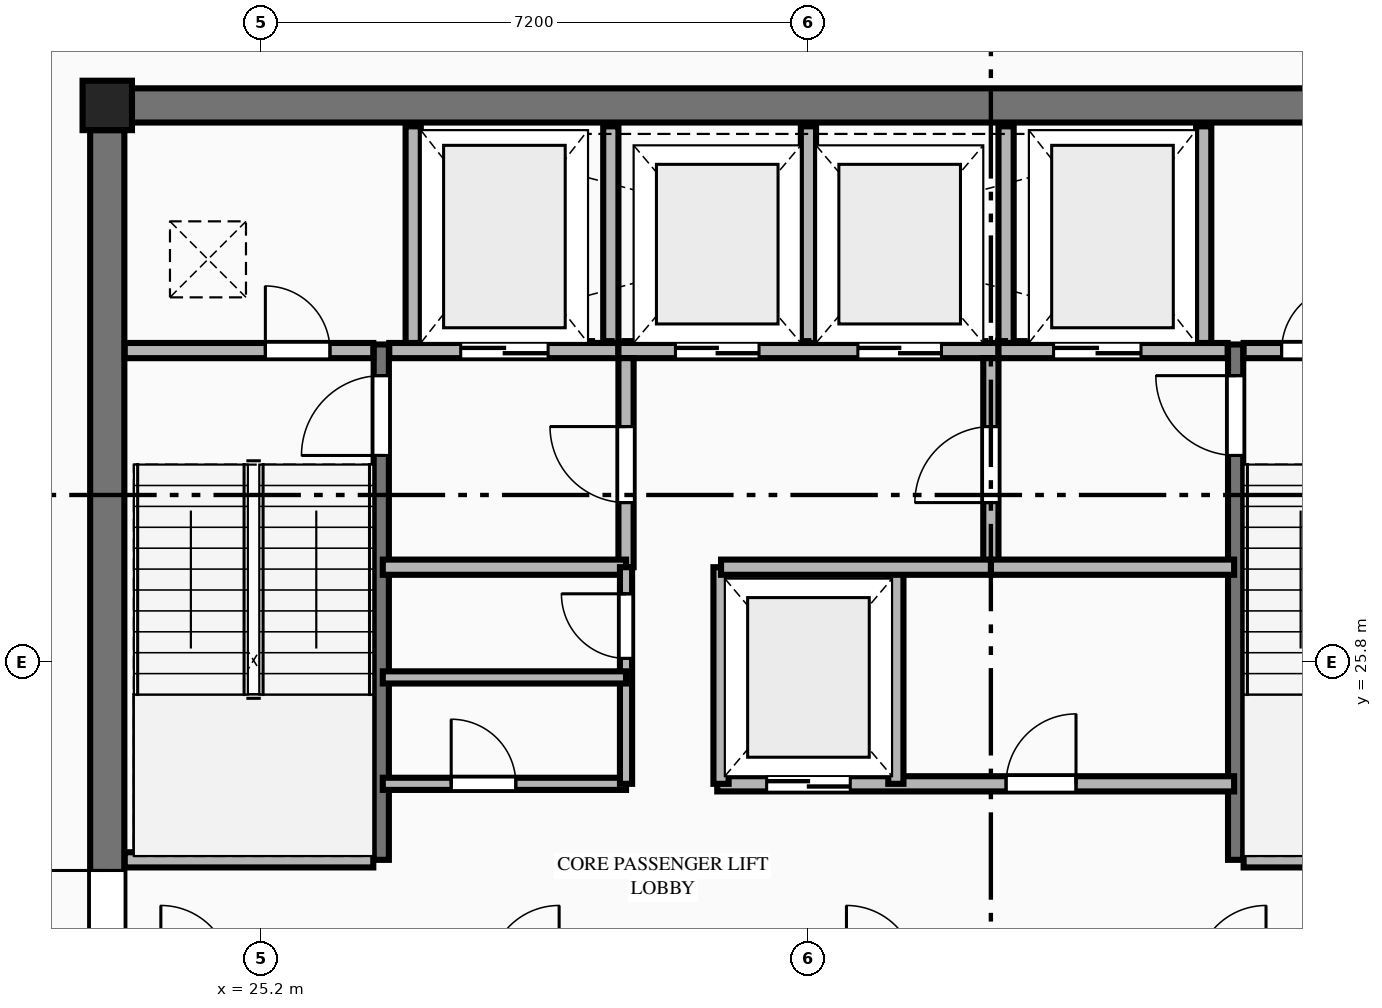
"""IFC4 building model, lengths in metres.
Left out: names, types, materials, properties, quantities, classifications, styles, units other than length and angle.
Written with IfcOpenShell. Run it as: python <this file> out.ifc"""

import sys

from ifc_helpers import new_model, si_unit, direction, frame, frame_2d, origin, origin_2d, place, context, subcontext, project, spatial, rectangle, extrude, element, fill, save


model = new_model("IFC4")
c1 = context("Model", 3, precision=1e-05, world=origin(), true_north=direction((0.0, 1.0)))
c2 = subcontext(c1, "Body", "Model", "MODEL_VIEW")
j1 = project(units=[si_unit("LENGTHUNIT", "METRE"), si_unit("PLANEANGLEUNIT", "RADIAN")], contexts=[c1])
p1 = place(None, origin())
s1 = spatial("IfcSite", under=j1, at=p1, CompositionType="ELEMENT")
p2 = place(p1, origin())
s2 = spatial("IfcBuilding", under=s1, at=p2, CompositionType="ELEMENT")
p3 = place(p2, frame((0.0, 0.0, 291.5)))
s3 = spatial("IfcBuildingStorey", under=s2, at=p3, CompositionType="ELEMENT", Elevation=291.5)
p4 = place(p3, frame((23.175, 33.125, 0.0), z_axis=(0.0, 0.0, 1.0), x_axis=(1.0, 0.0, 0.0)))
e1 = element("IfcColumn", 1, at=p4, inside=s3, PredefinedType="COLUMN", context=c2, shape_type="SweptSolid", body=[
    extrude(rectangle(XDim=0.65, YDim=0.65, at=origin_2d()), origin(), (0.0, 0.0, 1.0), 4.0),
])
p5 = place(p3, frame((23.5, 33.125, 0.0), z_axis=(0.0, 0.0, 1.0), x_axis=(1.0, 0.0, 0.0)))
e2 = element("IfcWall", 2, at=p5, inside=s3, PredefinedType="SHEAR", context=c2, shape_type="SweptSolid", body=[
    extrude(rectangle(XDim=17.8, YDim=0.45, at=frame_2d((8.9, 0.0))), origin(), (0.0, 0.0, 1.0), 3.8),
])
p6 = place(p3, frame((23.175, 19.0, 0.0), z_axis=(0.0, 0.0, 1.0), x_axis=(0.0, 1.0, 0.0)))
e3 = element("IfcWall", 3, at=p6, inside=s3, PredefinedType="SHEAR", context=c2, shape_type="SweptSolid", body=[
    extrude(rectangle(XDim=13.8, YDim=0.45, at=frame_2d((6.9, 0.0))), origin(), (0.0, 0.0, 1.0), 3.8),
])
p7 = place(p6, frame((2.84, 0.0, 0.0)))
e4 = element("IfcOpeningElement", 4, at=p7, cuts=e3, PredefinedType="OPENING", context=c2, shape_type="SweptSolid", body=[
    extrude(rectangle(XDim=1.22, YDim=2.25, at=frame_2d((0.61, 1.125))), frame((0.0, 0.235, 0.0), z_axis=(0.0, -1.0, 0.0), x_axis=(1.0, 0.0, 0.0)), (0.0, 0.0, 1.0), 0.47),
])
p8 = place(p3, frame((26.78, 23.2, 0.0), z_axis=(0.0, 0.0, 1.0), x_axis=(0.0, 1.0, 0.0)))
e5 = element("IfcWall", 5, at=p8, inside=s3, PredefinedType="SHEAR", context=c2, shape_type="SweptSolid", body=[
    extrude(rectangle(XDim=6.78, YDim=0.2, at=frame_2d((3.39, 0.0))), origin(), (0.0, 0.0, 1.0), 4.0),
])
p9 = place(p8, frame((5.32, 0.0, 0.0)))
e6 = element("IfcOpeningElement", 6, at=p9, cuts=e5, PredefinedType="OPENING", context=c2, shape_type="SweptSolid", body=[
    extrude(rectangle(XDim=1.05, YDim=2.15, at=frame_2d((0.525, 1.075))), frame((0.0, 0.11, 0.0), z_axis=(0.0, -1.0, 0.0), x_axis=(1.0, 0.0, 0.0)), (0.0, 0.0, 1.0), 0.22),
])
p10 = place(p3, frame((23.405, 23.2, 0.0), z_axis=(0.0, 0.0, 1.0), x_axis=(1.0, 0.0, 0.0)))
e7 = element("IfcWall", 7, at=p10, inside=s3, PredefinedType="PLUMBINGWALL", context=c2, shape_type="SweptSolid", body=[
    extrude(rectangle(XDim=3.27, YDim=0.2, at=frame_2d((1.635, 0.0))), origin(), (0.0, 0.0, 1.0), 3.8),
])
p11 = place(p3, frame((38.02, 23.2, 0.0), z_axis=(0.0, 0.0, 1.0), x_axis=(0.0, 1.0, 0.0)))
e8 = element("IfcWall", 8, at=p11, inside=s3, PredefinedType="SHEAR", context=c2, shape_type="SweptSolid", body=[
    extrude(rectangle(XDim=6.78, YDim=0.2, at=frame_2d((3.39, 0.0))), origin(), (0.0, 0.0, 1.0), 4.0),
])
p12 = place(p11, frame((5.32, 0.0, 0.0)))
e9 = element("IfcOpeningElement", 9, at=p12, cuts=e8, PredefinedType="OPENING", context=c2, shape_type="SweptSolid", body=[
    extrude(rectangle(XDim=1.05, YDim=2.15, at=frame_2d((0.525, 1.075))), frame((0.0, 0.11, 0.0), z_axis=(0.0, -1.0, 0.0), x_axis=(1.0, 0.0, 0.0)), (0.0, 0.0, 1.0), 0.22),
])
p13 = place(p3, frame((38.125, 23.2, 0.0), z_axis=(0.0, 0.0, 1.0), x_axis=(1.0, 0.0, 0.0)))
e10 = element("IfcWall", 10, at=p13, inside=s3, PredefinedType="PLUMBINGWALL", context=c2, shape_type="SweptSolid", body=[
    extrude(rectangle(XDim=3.27, YDim=0.2, at=frame_2d((1.635, 0.0))), origin(), (0.0, 0.0, 1.0), 3.8),
])
p14 = place(p3, frame((23.405, 29.9, 0.0), z_axis=(0.0, 0.0, 1.0), x_axis=(1.0, 0.0, 0.0)))
e11 = element("IfcWall", 11, at=p14, inside=s3, PredefinedType="PLUMBINGWALL", context=c2, shape_type="SweptSolid", body=[
    extrude(rectangle(XDim=3.27, YDim=0.2, at=frame_2d((1.635, 0.0))), origin(), (0.0, 0.0, 1.0), 3.8),
])
p15 = place(p14, frame((1.85, 0.0, 0.0)))
e12 = element("IfcOpeningElement", 12, at=p15, cuts=e11, PredefinedType="OPENING", context=c2, shape_type="SweptSolid", body=[
    extrude(rectangle(XDim=0.85, YDim=2.05, at=frame_2d((0.425, 1.025))), frame((0.0, 0.11, 0.0), z_axis=(0.0, -1.0, 0.0), x_axis=(1.0, 0.0, 0.0)), (0.0, 0.0, 1.0), 0.22),
])
p16 = place(p3, frame((26.885, 29.9, 0.0), z_axis=(0.0, 0.0, 1.0), x_axis=(1.0, 0.0, 0.0)))
e13 = element("IfcWall", 13, at=p16, inside=s3, PredefinedType="PLUMBINGWALL", context=c2, shape_type="SweptSolid", body=[
    extrude(rectangle(XDim=3.015, YDim=0.2, at=frame_2d((1.507, 0.0))), origin(), (0.0, 0.0, 1.0), 3.8),
])
p17 = place(p16, frame((0.94, 0.0, 0.0)))
e14 = element("IfcOpeningElement", 14, at=p17, cuts=e13, PredefinedType="OPENING", context=c2, shape_type="SweptSolid", body=[
    extrude(rectangle(XDim=1.15, YDim=2.2, at=frame_2d((0.575, 1.1))), frame((0.0, 0.11, 0.0), z_axis=(0.0, -1.0, 0.0), x_axis=(1.0, 0.0, 0.0)), (0.0, 0.0, 1.0), 0.22),
])
p18 = place(p3, frame((29.9, 29.9, 0.0), z_axis=(0.0, 0.0, 1.0), x_axis=(1.0, 0.0, 0.0)))
e15 = element("IfcWall", 15, at=p18, inside=s3, PredefinedType="PLUMBINGWALL", context=c2, shape_type="SweptSolid", body=[
    extrude(rectangle(XDim=5.0, YDim=0.2, at=frame_2d((2.5, 0.0))), origin(), (0.0, 0.0, 1.0), 3.8),
])
p19 = place(p18, frame((0.75, 0.0, 0.0)))
e16 = element("IfcOpeningElement", 16, at=p19, cuts=e15, PredefinedType="OPENING", context=c2, shape_type="SweptSolid", body=[
    extrude(rectangle(XDim=1.1, YDim=2.2, at=frame_2d((0.55, 1.1))), frame((0.0, 0.11, 0.0), z_axis=(0.0, -1.0, 0.0), x_axis=(1.0, 0.0, 0.0)), (0.0, 0.0, 1.0), 0.22),
])
p20 = place(p18, frame((3.15, 0.0, 0.0)))
e17 = element("IfcOpeningElement", 17, at=p20, cuts=e15, PredefinedType="OPENING", context=c2, shape_type="SweptSolid", body=[
    extrude(rectangle(XDim=1.1, YDim=2.2, at=frame_2d((0.55, 1.1))), frame((0.0, 0.11, 0.0), z_axis=(0.0, -1.0, 0.0), x_axis=(1.0, 0.0, 0.0)), (0.0, 0.0, 1.0), 0.22),
])
p21 = place(p3, frame((34.9, 29.9, 0.0), z_axis=(0.0, 0.0, 1.0), x_axis=(1.0, 0.0, 0.0)))
e18 = element("IfcWall", 18, at=p21, inside=s3, PredefinedType="PLUMBINGWALL", context=c2, shape_type="SweptSolid", body=[
    extrude(rectangle(XDim=3.015, YDim=0.2, at=frame_2d((1.508, 0.0))), origin(), (0.0, 0.0, 1.0), 3.8),
])
p22 = place(p21, frame((0.725, 0.0, 0.0)))
e19 = element("IfcOpeningElement", 19, at=p22, cuts=e18, PredefinedType="OPENING", context=c2, shape_type="SweptSolid", body=[
    extrude(rectangle(XDim=1.15, YDim=2.2, at=frame_2d((0.575, 1.1))), frame((0.0, 0.11, 0.0), z_axis=(0.0, -1.0, 0.0), x_axis=(1.0, 0.0, 0.0)), (0.0, 0.0, 1.0), 0.22),
])
p23 = place(p3, frame((38.125, 29.9, 0.0), z_axis=(0.0, 0.0, 1.0), x_axis=(1.0, 0.0, 0.0)))
e20 = element("IfcWall", 20, at=p23, inside=s3, PredefinedType="PLUMBINGWALL", context=c2, shape_type="SweptSolid", body=[
    extrude(rectangle(XDim=3.27, YDim=0.2, at=frame_2d((1.635, 0.0))), origin(), (0.0, 0.0, 1.0), 3.8),
])
p24 = place(p23, frame((0.5, 0.0, 0.0)))
e21 = element("IfcOpeningElement", 21, at=p24, cuts=e20, PredefinedType="OPENING", context=c2, shape_type="SweptSolid", body=[
    extrude(rectangle(XDim=0.85, YDim=2.05, at=frame_2d((0.425, 1.025))), frame((0.0, 0.11, 0.0), z_axis=(0.0, -1.0, 0.0), x_axis=(1.0, 0.0, 0.0)), (0.0, 0.0, 1.0), 0.22),
])
for number, where, z_axis, x_axis in (
    (22, (27.2, 30.0, 0.0), (0.0, 0.0, 1.0), (0.0, 1.0, 0.0)),
    (23, (29.8, 30.0, 0.0), (0.0, 0.0, 1.0), (0.0, 1.0, 0.0)),
    (24, (32.4, 30.0, 0.0), (0.0, 0.0, 1.0), (0.0, 1.0, 0.0)),
    (25, (35.0, 30.0, 0.0), (0.0, 0.0, 1.0), (0.0, 1.0, 0.0)),
    (26, (37.6, 30.0, 0.0), (0.0, 0.0, 1.0), (0.0, 1.0, 0.0)),
):
    element("IfcWall", number, at=place(p3, frame(where, z_axis=z_axis, x_axis=x_axis)), inside=s3, PredefinedType="PLUMBINGWALL", context=c2, shape_type="SweptSolid", body=[
        extrude(rectangle(XDim=2.85, YDim=0.2, at=frame_2d((1.425, 0.0))), origin(), (0.0, 0.0, 1.0), 3.8),
    ])
p25 = place(p3, frame((30.0, 27.05, 0.0), z_axis=(0.0, 0.0, 1.0), x_axis=(0.0, 1.0, 0.0)))
e27 = element("IfcWall", 27, at=p25, inside=s3, PredefinedType="PLUMBINGWALL", context=c2, shape_type="SweptSolid", body=[
    extrude(rectangle(XDim=2.75, YDim=0.2, at=frame_2d((1.375, 0.0))), origin(), (0.0, 0.0, 1.0), 3.8),
])
p26 = place(p25, frame((0.85, 0.0, 0.0)))
e28 = element("IfcOpeningElement", 28, at=p26, cuts=e27, PredefinedType="OPENING", context=c2, shape_type="SweptSolid", body=[
    extrude(rectangle(XDim=1.0, YDim=2.15, at=frame_2d((0.5, 1.075))), frame((0.0, 0.11, 0.0), z_axis=(0.0, -1.0, 0.0), x_axis=(1.0, 0.0, 0.0)), (0.0, 0.0, 1.0), 0.22),
])
p27 = place(p3, frame((26.8, 27.05, 0.0), z_axis=(0.0, 0.0, 1.0), x_axis=(1.0, 0.0, 0.0)))
e29 = element("IfcWall", 29, at=p27, inside=s3, PredefinedType="PLUMBINGWALL", context=c2, shape_type="SweptSolid", body=[
    extrude(rectangle(XDim=3.2, YDim=0.2, at=frame_2d((1.6, 0.0))), origin(), (0.0, 0.0, 1.0), 3.8),
])
p28 = place(p3, frame((34.8, 27.05, 0.0), z_axis=(0.0, 0.0, 1.0), x_axis=(0.0, 1.0, 0.0)))
e30 = element("IfcWall", 30, at=p28, inside=s3, PredefinedType="PLUMBINGWALL", context=c2, shape_type="SweptSolid", body=[
    extrude(rectangle(XDim=2.75, YDim=0.2, at=frame_2d((1.375, 0.0))), origin(), (0.0, 0.0, 1.0), 3.8),
])
p29 = place(p28, frame((0.85, 0.0, 0.0)))
e31 = element("IfcOpeningElement", 31, at=p29, cuts=e30, PredefinedType="OPENING", context=c2, shape_type="SweptSolid", body=[
    extrude(rectangle(XDim=1.0, YDim=2.15, at=frame_2d((0.5, 1.075))), frame((0.0, 0.11, 0.0), z_axis=(0.0, -1.0, 0.0), x_axis=(1.0, 0.0, 0.0)), (0.0, 0.0, 1.0), 0.22),
])
p30 = place(p3, frame((34.8, 27.05, 0.0), z_axis=(0.0, 0.0, 1.0), x_axis=(1.0, 0.0, 0.0)))
e32 = element("IfcWall", 32, at=p30, inside=s3, PredefinedType="PLUMBINGWALL", context=c2, shape_type="SweptSolid", body=[
    extrude(rectangle(XDim=3.2, YDim=0.2, at=frame_2d((1.6, 0.0))), origin(), (0.0, 0.0, 1.0), 3.8),
])
p31 = place(p3, frame((26.8, 24.2, 0.0), z_axis=(0.0, 0.0, 1.0), x_axis=(1.0, 0.0, 0.0)))
e33 = element("IfcWall", 33, at=p31, inside=s3, PredefinedType="PARTITIONING", context=c2, shape_type="SweptSolid", body=[
    extrude(rectangle(XDim=3.2, YDim=0.16, at=frame_2d((1.6, 0.0))), origin(), (0.0, 0.0, 1.0), 3.8),
])
p32 = place(p31, frame((0.9, 0.0, 0.0)))
e34 = element("IfcOpeningElement", 34, at=p32, cuts=e33, PredefinedType="OPENING", context=c2, shape_type="SweptSolid", body=[
    extrude(rectangle(XDim=0.85, YDim=2.05, at=frame_2d((0.425, 1.025))), frame((0.0, 0.09, 0.0), z_axis=(0.0, -1.0, 0.0), x_axis=(1.0, 0.0, 0.0)), (0.0, 0.0, 1.0), 0.18),
])
p33 = place(p3, frame((30.0, 24.2, 0.0), z_axis=(0.0, 0.0, 1.0), x_axis=(0.0, 1.0, 0.0)))
e35 = element("IfcWall", 35, at=p33, inside=s3, PredefinedType="PARTITIONING", context=c2, shape_type="SweptSolid", body=[
    extrude(rectangle(XDim=2.85, YDim=0.16, at=frame_2d((1.425, 0.0))), origin(), (0.0, 0.0, 1.0), 3.8),
])
p34 = place(p33, frame((1.65, 0.0, 0.0)))
e36 = element("IfcOpeningElement", 36, at=p34, cuts=e35, PredefinedType="OPENING", context=c2, shape_type="SweptSolid", body=[
    extrude(rectangle(XDim=0.85, YDim=2.05, at=frame_2d((0.425, 1.025))), frame((0.0, 0.09, 0.0), z_axis=(0.0, -1.0, 0.0), x_axis=(1.0, 0.0, 0.0)), (0.0, 0.0, 1.0), 0.18),
])
p35 = place(p3, frame((31.2, 24.2, 0.0), z_axis=(0.0, 0.0, 1.0), x_axis=(1.0, 0.0, 0.0)))
e37 = element("IfcWall", 37, at=p35, inside=s3, PredefinedType="PLUMBINGWALL", context=c2, shape_type="SweptSolid", body=[
    extrude(rectangle(XDim=6.8, YDim=0.2, at=frame_2d((3.4, 0.0))), origin(), (0.0, 0.0, 1.0), 3.8),
])
p36 = place(p35, frame((0.65, 0.0, 0.0)))
e38 = element("IfcOpeningElement", 38, at=p36, cuts=e37, PredefinedType="OPENING", context=c2, shape_type="SweptSolid", body=[
    extrude(rectangle(XDim=1.1, YDim=2.2, at=frame_2d((0.55, 1.1))), frame((0.0, 0.11, 0.0), z_axis=(0.0, -1.0, 0.0), x_axis=(1.0, 0.0, 0.0)), (0.0, 0.0, 1.0), 0.22),
])
p37 = place(p35, frame((3.8, 0.0, 0.0)))
e39 = element("IfcOpeningElement", 39, at=p37, cuts=e37, PredefinedType="OPENING", context=c2, shape_type="SweptSolid", body=[
    extrude(rectangle(XDim=0.92, YDim=2.15, at=frame_2d((0.46, 1.075))), frame((0.0, 0.11, 0.0), z_axis=(0.0, -1.0, 0.0), x_axis=(1.0, 0.0, 0.0)), (0.0, 0.0, 1.0), 0.22),
])
for number, where, z_axis, x_axis in (
    (40, (31.25, 24.2, 0.0), (0.0, 0.0, 1.0), (0.0, 1.0, 0.0)),
    (41, (33.55, 24.2, 0.0), (0.0, 0.0, 1.0), (0.0, 1.0, 0.0)),
):
    element("IfcWall", number, at=place(p3, frame(where, z_axis=z_axis, x_axis=x_axis)), inside=s3, PredefinedType="PLUMBINGWALL", context=c2, shape_type="SweptSolid", body=[
        extrude(rectangle(XDim=2.85, YDim=0.2, at=frame_2d((1.425, 0.0))), origin(), (0.0, 0.0, 1.0), 3.8),
    ])
p38 = place(p3, frame((31.25, 27.05, 0.0), z_axis=(0.0, 0.0, 1.0), x_axis=(1.0, 0.0, 0.0)))
e42 = element("IfcWall", 42, at=p38, inside=s3, PredefinedType="PLUMBINGWALL", context=c2, shape_type="SweptSolid", body=[
    extrude(rectangle(XDim=3.55, YDim=0.2, at=frame_2d((1.775, 0.0))), origin(), (0.0, 0.0, 1.0), 3.8),
])
p39 = place(p3, frame((26.8, 25.6, 0.0), z_axis=(0.0, 0.0, 1.0), x_axis=(1.0, 0.0, 0.0)))
e43 = element("IfcWall", 43, at=p39, inside=s3, PredefinedType="PARTITIONING", context=c2, shape_type="SweptSolid", body=[
    extrude(rectangle(XDim=3.2, YDim=0.16, at=frame_2d((1.6, 0.0))), origin(), (0.0, 0.0, 1.0), 3.8),
])
p40 = place(p7, origin())
e44 = element("IfcDoor", 44, at=p40, inside=s3, OperationType="SINGLE_SWING_RIGHT", PredefinedType="DOOR", context=c2, shape_type="SweptSolid", body=[
    extrude(rectangle(XDim=1.22, YDim=2.25, at=frame_2d((0.61, 1.125))), frame((0.0, 0.025, 0.0), z_axis=(0.0, -1.0, 0.0), x_axis=(1.0, 0.0, 0.0)), (0.0, 0.0, 1.0), 0.05),
])
fill(e4, e44)
p41 = place(p9, origin())
e45 = element("IfcDoor", 45, at=p41, inside=s3, OperationType="SINGLE_SWING_LEFT", PredefinedType="DOOR", context=c2, shape_type="SweptSolid", body=[
    extrude(rectangle(XDim=1.05, YDim=2.15, at=frame_2d((0.525, 1.075))), frame((0.0, 0.025, 0.0), z_axis=(0.0, -1.0, 0.0), x_axis=(1.0, 0.0, 0.0)), (0.0, 0.0, 1.0), 0.05),
])
fill(e6, e45)
p42 = place(p12, origin())
e46 = element("IfcDoor", 46, at=p42, inside=s3, OperationType="SINGLE_SWING_RIGHT", PredefinedType="DOOR", context=c2, shape_type="SweptSolid", body=[
    extrude(rectangle(XDim=1.05, YDim=2.15, at=frame_2d((0.525, 1.075))), frame((0.0, 0.025, 0.0), z_axis=(0.0, -1.0, 0.0), x_axis=(1.0, 0.0, 0.0)), (0.0, 0.0, 1.0), 0.05),
])
fill(e9, e46)
p43 = place(p15, origin())
e47 = element("IfcDoor", 47, at=p43, inside=s3, OperationType="SINGLE_SWING_LEFT", PredefinedType="DOOR", context=c2, shape_type="SweptSolid", body=[
    extrude(rectangle(XDim=0.85, YDim=2.05, at=frame_2d((0.425, 1.025))), frame((0.0, 0.025, 0.0), z_axis=(0.0, -1.0, 0.0), x_axis=(1.0, 0.0, 0.0)), (0.0, 0.0, 1.0), 0.05),
])
fill(e12, e47)
p44 = place(p24, origin())
e48 = element("IfcDoor", 48, at=p44, inside=s3, OperationType="SINGLE_SWING_RIGHT", PredefinedType="DOOR", context=c2, shape_type="SweptSolid", body=[
    extrude(rectangle(XDim=0.85, YDim=2.05, at=frame_2d((0.425, 1.025))), frame((0.0, 0.025, 0.0), z_axis=(0.0, -1.0, 0.0), x_axis=(1.0, 0.0, 0.0)), (0.0, 0.0, 1.0), 0.05),
])
fill(e21, e48)
p45 = place(p17, origin())
e49 = element("IfcDoor", 49, at=p45, inside=s3, OperationType="DOUBLE_DOOR_SLIDING", PredefinedType="DOOR", context=c2, shape_type="SweptSolid", body=[
    extrude(rectangle(XDim=1.15, YDim=2.2, at=frame_2d((0.575, 1.1))), frame((0.0, 0.025, 0.0), z_axis=(0.0, -1.0, 0.0), x_axis=(1.0, 0.0, 0.0)), (0.0, 0.0, 1.0), 0.05),
])
fill(e14, e49)
p46 = place(p22, origin())
e50 = element("IfcDoor", 50, at=p46, inside=s3, OperationType="DOUBLE_DOOR_SLIDING", PredefinedType="DOOR", context=c2, shape_type="SweptSolid", body=[
    extrude(rectangle(XDim=1.15, YDim=2.2, at=frame_2d((0.575, 1.1))), frame((0.0, 0.025, 0.0), z_axis=(0.0, -1.0, 0.0), x_axis=(1.0, 0.0, 0.0)), (0.0, 0.0, 1.0), 0.05),
])
fill(e19, e50)
p47 = place(p19, origin())
e51 = element("IfcDoor", 51, at=p47, inside=s3, OperationType="DOUBLE_DOOR_SLIDING", PredefinedType="DOOR", context=c2, shape_type="SweptSolid", body=[
    extrude(rectangle(XDim=1.1, YDim=2.2, at=frame_2d((0.55, 1.1))), frame((0.0, 0.025, 0.0), z_axis=(0.0, -1.0, 0.0), x_axis=(1.0, 0.0, 0.0)), (0.0, 0.0, 1.0), 0.05),
])
fill(e16, e51)
p48 = place(p20, origin())
e52 = element("IfcDoor", 52, at=p48, inside=s3, OperationType="DOUBLE_DOOR_SLIDING", PredefinedType="DOOR", context=c2, shape_type="SweptSolid", body=[
    extrude(rectangle(XDim=1.1, YDim=2.2, at=frame_2d((0.55, 1.1))), frame((0.0, 0.025, 0.0), z_axis=(0.0, -1.0, 0.0), x_axis=(1.0, 0.0, 0.0)), (0.0, 0.0, 1.0), 0.05),
])
fill(e17, e52)
p49 = place(p26, origin())
e53 = element("IfcDoor", 53, at=p49, inside=s3, OperationType="SINGLE_SWING_RIGHT", PredefinedType="DOOR", context=c2, shape_type="SweptSolid", body=[
    extrude(rectangle(XDim=1.0, YDim=2.15, at=frame_2d((0.5, 1.075))), frame((0.0, 0.025, 0.0), z_axis=(0.0, -1.0, 0.0), x_axis=(1.0, 0.0, 0.0)), (0.0, 0.0, 1.0), 0.05),
])
fill(e28, e53)
p50 = place(p29, origin())
e54 = element("IfcDoor", 54, at=p50, inside=s3, OperationType="SINGLE_SWING_LEFT", PredefinedType="DOOR", context=c2, shape_type="SweptSolid", body=[
    extrude(rectangle(XDim=1.0, YDim=2.15, at=frame_2d((0.5, 1.075))), frame((0.0, 0.025, 0.0), z_axis=(0.0, -1.0, 0.0), x_axis=(1.0, 0.0, 0.0)), (0.0, 0.0, 1.0), 0.05),
])
fill(e31, e54)
p51 = place(p36, origin())
e55 = element("IfcDoor", 55, at=p51, inside=s3, OperationType="DOUBLE_DOOR_SLIDING", PredefinedType="DOOR", context=c2, shape_type="SweptSolid", body=[
    extrude(rectangle(XDim=1.1, YDim=2.2, at=frame_2d((0.55, 1.1))), frame((0.0, 0.025, 0.0), z_axis=(0.0, -1.0, 0.0), x_axis=(1.0, 0.0, 0.0)), (0.0, 0.0, 1.0), 0.05),
])
fill(e38, e55)
p52 = place(p32, origin())
e56 = element("IfcDoor", 56, at=p52, inside=s3, OperationType="SINGLE_SWING_LEFT", PredefinedType="DOOR", context=c2, shape_type="SweptSolid", body=[
    extrude(rectangle(XDim=0.85, YDim=2.05, at=frame_2d((0.425, 1.025))), frame((0.0, 0.025, 0.0), z_axis=(0.0, -1.0, 0.0), x_axis=(1.0, 0.0, 0.0)), (0.0, 0.0, 1.0), 0.05),
])
fill(e34, e56)
p53 = place(p34, origin())
e57 = element("IfcDoor", 57, at=p53, inside=s3, OperationType="SINGLE_SWING_RIGHT", PredefinedType="DOOR", context=c2, shape_type="SweptSolid", body=[
    extrude(rectangle(XDim=0.85, YDim=2.05, at=frame_2d((0.425, 1.025))), frame((0.0, 0.025, 0.0), z_axis=(0.0, -1.0, 0.0), x_axis=(1.0, 0.0, 0.0)), (0.0, 0.0, 1.0), 0.05),
])
fill(e36, e57)
p54 = place(p37, origin())
e58 = element("IfcDoor", 58, at=p54, inside=s3, OperationType="SINGLE_SWING_RIGHT", PredefinedType="DOOR", context=c2, shape_type="SweptSolid", body=[
    extrude(rectangle(XDim=0.92, YDim=2.15, at=frame_2d((0.46, 1.075))), frame((0.0, 0.025, 0.0), z_axis=(0.0, -1.0, 0.0), x_axis=(1.0, 0.0, 0.0)), (0.0, 0.0, 1.0), 0.05),
])
fill(e39, e58)
save(model, sys.argv[1])
